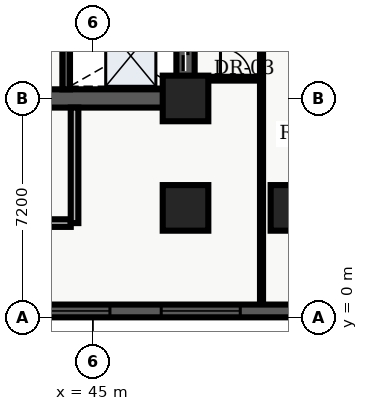
"""IFC4 building model, lengths in metres.
Left out: names, types, materials, properties, quantities, classifications, styles, units other than length and angle.
Written with IfcOpenShell. Run it as: python <this file> out.ifc"""

import sys

from ifc_helpers import new_model, entity, si_unit, converted_unit, direction, frame, origin_with_axes, origin_2d_with_axis, place, context, subcontext, project, spatial, polyline, rectangle, outline, extrude, element, fill, save


model = new_model("IFC4")
c1 = context("Model", 3, precision=1e-05, world=origin_with_axes(), true_north=direction((0.0, 1.0)))
c2 = subcontext(c1, "Body", "Model", "MODEL_VIEW")
j1 = project(units=[si_unit("LENGTHUNIT", "METRE"), converted_unit("PLANEANGLEUNIT", "DEGREE", entity("IfcPlaneAngleMeasure", 0.017), si_unit("PLANEANGLEUNIT", "RADIAN"), dimensions=[0, 0, 0, 0, 0, 0, 0])], contexts=[c1])
p1 = place(None, origin_with_axes())
s1 = spatial("IfcSite", under=j1, at=p1, CompositionType="ELEMENT")
p2 = place(p1, origin_with_axes())
s2 = spatial("IfcBuilding", under=s1, at=p2, CompositionType="ELEMENT")
p3 = place(p2, frame((0.0, 0.0, 10.8), z_axis=(0.0, 0.0, 1.0), x_axis=(1.0, 0.0, 0.0)))
s3 = spatial("IfcBuildingStorey", under=s2, at=p3, CompositionType="ELEMENT", Elevation=10.8)
p4 = place(p3, frame((40.2, 7.2, 0.0), z_axis=(0.0, 0.0, 1.0), x_axis=(1.0, 0.0, 0.0)))
e1 = element("IfcWall", 1, at=p4, inside=s3, PredefinedType="SHEAR", context=c2, shape_type="SweptSolid", body=[
    extrude(outline(polyline([(0.0, -0.3), (7.85, -0.3), (7.85, 0.3), (0.0, 0.3), (0.0, -0.3)])), origin_with_axes(), (0.0, 0.0, 1.0), 4.26),
])
p5 = place(p4, frame((2.175, 0.0, 0.0), z_axis=(0.0, 0.0, 1.0), x_axis=(1.0, 0.0, 0.0)))
e2 = element("IfcOpeningElement", 2, at=p5, cuts=e1, PredefinedType="OPENING", context=c2, shape_type="SweptSolid", body=[
    extrude(rectangle(XDim=1.05, YDim=0.62, at=origin_2d_with_axis()), origin_with_axes(), (0.0, 0.0, 1.0), 2.15),
])
p6 = place(p3, frame((48.05, 7.2, 0.0), z_axis=(0.0, 0.0, 1.0), x_axis=(0.0, 1.0, 0.0)))
e3 = element("IfcWall", 3, at=p6, inside=s3, PredefinedType="SHEAR", context=c2, shape_type="SweptSolid", body=[
    extrude(outline(polyline([(0.0, -0.3), (15.6, -0.3), (15.6, 0.3), (0.0, 0.3), (0.0, -0.3)])), origin_with_axes(), (0.0, 0.0, 1.0), 4.26),
])
p7 = place(p6, frame((1.425, 0.0, 0.0), z_axis=(0.0, 0.0, 1.0), x_axis=(1.0, 0.0, 0.0)))
e4 = element("IfcOpeningElement", 4, at=p7, cuts=e3, PredefinedType="OPENING", context=c2, shape_type="SweptSolid", body=[
    extrude(rectangle(XDim=1.05, YDim=0.62, at=origin_2d_with_axis()), origin_with_axes(), (0.0, 0.0, 1.0), 2.15),
])
p8 = place(p6, frame((3.475, 0.0, 0.0), z_axis=(0.0, 0.0, 1.0), x_axis=(1.0, 0.0, 0.0)))
e5 = element("IfcOpeningElement", 5, at=p8, cuts=e3, PredefinedType="OPENING", context=c2, shape_type="SweptSolid", body=[
    extrude(rectangle(XDim=1.05, YDim=0.62, at=origin_2d_with_axis()), origin_with_axes(), (0.0, 0.0, 1.0), 2.15),
])
p9 = place(p6, frame((5.625, 0.0, 0.0), z_axis=(0.0, 0.0, 1.0), x_axis=(1.0, 0.0, 0.0)))
e6 = element("IfcOpeningElement", 6, at=p9, cuts=e3, PredefinedType="OPENING", context=c2, shape_type="SweptSolid", body=[
    extrude(rectangle(XDim=0.95, YDim=0.62, at=origin_2d_with_axis()), origin_with_axes(), (0.0, 0.0, 1.0), 2.15),
])
p10 = place(p3, frame((44.125, 7.5, 0.0), z_axis=(0.0, 0.0, 1.0), x_axis=(0.0, 1.0, 0.0)))
e7 = element("IfcWall", 7, at=p10, inside=s3, PredefinedType="SHEAR", context=c2, shape_type="SweptSolid", body=[
    extrude(outline(polyline([(0.0, -0.125), (15.0, -0.125), (15.0, 0.125), (0.0, 0.125), (0.0, -0.125)])), origin_with_axes(), (0.0, 0.0, 1.0), 4.26),
])
p11 = place(p3, frame((40.325, 3.1, 0.0), z_axis=(0.0, 0.0, 1.0), x_axis=(1.0, 0.0, 0.0)))
e8 = element("IfcWall", 8, at=p11, inside=s3, PredefinedType="SOLIDWALL", context=c2, shape_type="SweptSolid", body=[
    extrude(outline(polyline([(0.0, -0.125), (3.95, -0.125), (3.95, 0.125), (0.0, 0.125), (0.0, -0.125)])), origin_with_axes(), (0.0, 0.0, 1.0), 3.3),
])
p12 = place(p3, frame((44.4, 3.1, 0.0), z_axis=(0.0, 0.0, 1.0), x_axis=(0.0, 1.0, 0.0)))
e9 = element("IfcWall", 9, at=p12, inside=s3, PredefinedType="SOLIDWALL", context=c2, shape_type="SweptSolid", body=[
    extrude(outline(polyline([(0.0, -0.125), (3.8, -0.125), (3.8, 0.125), (0.0, 0.125), (0.0, -0.125)])), origin_with_axes(), (0.0, 0.0, 1.0), 3.3),
])
for number, where, z_axis, x_axis in (
    (10, (48.05, 3.6, 0.0), (0.0, 0.0, 1.0), (1.0, 0.0, 0.0)),
    (11, (48.05, 7.2, 0.0), (0.0, 0.0, 1.0), (1.0, 0.0, 0.0)),
    (12, (51.6, 3.6, 0.0), (0.0, 0.0, 1.0), (1.0, 0.0, 0.0)),
):
    element("IfcColumn", number, at=place(p3, frame(where, z_axis=z_axis, x_axis=x_axis)), inside=s3, PredefinedType="COLUMN", context=c2, shape_type="SweptSolid", body=[
        extrude(rectangle(XDim=1.5, YDim=1.5, at=origin_2d_with_axis()), origin_with_axes(), (0.0, 0.0, 1.0), 4.5),
    ])
p13 = place(p3, frame((50.55, 0.38, 0.0), z_axis=(0.0, 0.0, 1.0), x_axis=(0.0, 1.0, 0.0)))
e13 = element("IfcWall", 13, at=p13, inside=s3, PredefinedType="PARTITIONING", context=c2, shape_type="SweptSolid", body=[
    extrude(outline(polyline([(0.0, -0.05), (38.84, -0.05), (38.84, 0.05), (0.0, 0.05), (0.0, -0.05)])), origin_with_axes(), (0.0, 0.0, 1.0), 3.2),
])
p14 = place(p13, frame((12.8, 0.0, 0.0), z_axis=(0.0, 0.0, 1.0), x_axis=(1.0, 0.0, 0.0)))
e14 = element("IfcOpeningElement", 14, at=p14, cuts=e13, PredefinedType="OPENING", context=c2, shape_type="SweptSolid", body=[
    extrude(rectangle(XDim=1.6, YDim=0.12, at=origin_2d_with_axis()), origin_with_axes(), (0.0, 0.0, 1.0), 2.2),
])
p15 = place(p13, frame((27.8, 0.0, 0.0), z_axis=(0.0, 0.0, 1.0), x_axis=(1.0, 0.0, 0.0)))
e15 = element("IfcOpeningElement", 15, at=p15, cuts=e13, PredefinedType="OPENING", context=c2, shape_type="SweptSolid", body=[
    extrude(rectangle(XDim=1.6, YDim=0.12, at=origin_2d_with_axis()), origin_with_axes(), (0.0, 0.0, 1.0), 2.2),
])
p16 = place(p3, frame((48.05, 7.85, 0.0), z_axis=(0.0, 0.0, 1.0), x_axis=(1.0, 0.0, 0.0)))
e16 = element("IfcWall", 16, at=p16, inside=s3, PredefinedType="PARTITIONING", context=c2, shape_type="SweptSolid", body=[
    extrude(outline(polyline([(0.0, -0.062), (2.5, -0.062), (2.5, 0.062), (0.0, 0.062), (0.0, -0.062)])), origin_with_axes(), (0.0, 0.0, 1.0), 3.2),
])
p17 = place(p16, frame((1.65, 0.0, 0.0), z_axis=(0.0, 0.0, 1.0), x_axis=(1.0, 0.0, 0.0)))
e17 = element("IfcOpeningElement", 17, at=p17, cuts=e16, PredefinedType="OPENING", context=c2, shape_type="SweptSolid", body=[
    extrude(rectangle(XDim=1.0, YDim=0.145, at=origin_2d_with_axis()), origin_with_axes(), (0.0, 0.0, 1.0), 2.15),
])
p18 = place(p3, frame((67.98, 0.21, 0.0), z_axis=(0.0, 0.0, 1.0), x_axis=(-1.0, 0.0, 0.0)))
e18 = element("IfcWall", 18, at=p18, inside=s3, PredefinedType="SOLIDWALL", context=c2, shape_type="SweptSolid", body=[
    extrude(outline(polyline([(0.0, -0.21), (67.98, -0.21), (67.98, 0.21), (0.0, 0.21), (0.0, -0.21)])), origin_with_axes(), (0.0, 0.0, 1.0), 4.26),
])
p19 = place(p18, frame((3.168, 0.0, 0.45), z_axis=(0.0, 0.0, 1.0), x_axis=(1.0, 0.0, 0.0)))
e19 = element("IfcOpeningElement", 19, at=p19, cuts=e18, PredefinedType="OPENING", context=c2, shape_type="SweptSolid", body=[
    extrude(rectangle(XDim=2.6, YDim=0.44, at=origin_2d_with_axis()), origin_with_axes(), (0.0, 0.0, 1.0), 2.8),
])
p20 = place(p18, frame((8.305, 0.0, 0.45), z_axis=(0.0, 0.0, 1.0), x_axis=(1.0, 0.0, 0.0)))
e20 = element("IfcOpeningElement", 20, at=p20, cuts=e18, PredefinedType="OPENING", context=c2, shape_type="SweptSolid", body=[
    extrude(rectangle(XDim=2.6, YDim=0.44, at=origin_2d_with_axis()), origin_with_axes(), (0.0, 0.0, 1.0), 2.8),
])
p21 = place(p18, frame((13.442, 0.0, 0.45), z_axis=(0.0, 0.0, 1.0), x_axis=(1.0, 0.0, 0.0)))
e21 = element("IfcOpeningElement", 21, at=p21, cuts=e18, PredefinedType="OPENING", context=c2, shape_type="SweptSolid", body=[
    extrude(rectangle(XDim=2.6, YDim=0.44, at=origin_2d_with_axis()), origin_with_axes(), (0.0, 0.0, 1.0), 2.8),
])
p22 = place(p18, frame((19.429, 0.0, 0.45), z_axis=(0.0, 0.0, 1.0), x_axis=(1.0, 0.0, 0.0)))
e22 = element("IfcOpeningElement", 22, at=p22, cuts=e18, PredefinedType="OPENING", context=c2, shape_type="SweptSolid", body=[
    extrude(rectangle(XDim=2.6, YDim=0.44, at=origin_2d_with_axis()), origin_with_axes(), (0.0, 0.0, 1.0), 2.8),
])
p23 = place(p18, frame((23.716, 0.0, 0.45), z_axis=(0.0, 0.0, 1.0), x_axis=(1.0, 0.0, 0.0)))
e23 = element("IfcOpeningElement", 23, at=p23, cuts=e18, PredefinedType="OPENING", context=c2, shape_type="SweptSolid", body=[
    extrude(rectangle(XDim=2.6, YDim=0.44, at=origin_2d_with_axis()), origin_with_axes(), (0.0, 0.0, 1.0), 2.8),
])
p24 = place(p18, frame((28.853, 0.0, 0.45), z_axis=(0.0, 0.0, 1.0), x_axis=(1.0, 0.0, 0.0)))
e24 = element("IfcOpeningElement", 24, at=p24, cuts=e18, PredefinedType="OPENING", context=c2, shape_type="SweptSolid", body=[
    extrude(rectangle(XDim=2.6, YDim=0.44, at=origin_2d_with_axis()), origin_with_axes(), (0.0, 0.0, 1.0), 2.8),
])
p25 = place(p18, frame((33.99, 0.0, 0.45), z_axis=(0.0, 0.0, 1.0), x_axis=(1.0, 0.0, 0.0)))
e25 = element("IfcOpeningElement", 25, at=p25, cuts=e18, PredefinedType="OPENING", context=c2, shape_type="SweptSolid", body=[
    extrude(rectangle(XDim=2.6, YDim=0.44, at=origin_2d_with_axis()), origin_with_axes(), (0.0, 0.0, 1.0), 2.8),
])
p26 = place(p18, frame((39.127, 0.0, 0.45), z_axis=(0.0, 0.0, 1.0), x_axis=(1.0, 0.0, 0.0)))
e26 = element("IfcOpeningElement", 26, at=p26, cuts=e18, PredefinedType="OPENING", context=c2, shape_type="SweptSolid", body=[
    extrude(rectangle(XDim=2.6, YDim=0.44, at=origin_2d_with_axis()), origin_with_axes(), (0.0, 0.0, 1.0), 2.8),
])
p27 = place(p18, frame((44.264, 0.0, 0.45), z_axis=(0.0, 0.0, 1.0), x_axis=(1.0, 0.0, 0.0)))
e27 = element("IfcOpeningElement", 27, at=p27, cuts=e18, PredefinedType="OPENING", context=c2, shape_type="SweptSolid", body=[
    extrude(rectangle(XDim=2.6, YDim=0.44, at=origin_2d_with_axis()), origin_with_axes(), (0.0, 0.0, 1.0), 2.8),
])
p28 = place(p18, frame((49.401, 0.0, 0.45), z_axis=(0.0, 0.0, 1.0), x_axis=(1.0, 0.0, 0.0)))
e28 = element("IfcOpeningElement", 28, at=p28, cuts=e18, PredefinedType="OPENING", context=c2, shape_type="SweptSolid", body=[
    extrude(rectangle(XDim=2.6, YDim=0.44, at=origin_2d_with_axis()), origin_with_axes(), (0.0, 0.0, 1.0), 2.8),
])
p29 = place(p18, frame((54.538, 0.0, 0.45), z_axis=(0.0, 0.0, 1.0), x_axis=(1.0, 0.0, 0.0)))
e29 = element("IfcOpeningElement", 29, at=p29, cuts=e18, PredefinedType="OPENING", context=c2, shape_type="SweptSolid", body=[
    extrude(rectangle(XDim=2.6, YDim=0.44, at=origin_2d_with_axis()), origin_with_axes(), (0.0, 0.0, 1.0), 2.8),
])
p30 = place(p18, frame((59.675, 0.0, 0.45), z_axis=(0.0, 0.0, 1.0), x_axis=(1.0, 0.0, 0.0)))
e30 = element("IfcOpeningElement", 30, at=p30, cuts=e18, PredefinedType="OPENING", context=c2, shape_type="SweptSolid", body=[
    extrude(rectangle(XDim=2.6, YDim=0.44, at=origin_2d_with_axis()), origin_with_axes(), (0.0, 0.0, 1.0), 2.8),
])
p31 = place(p18, frame((64.812, 0.0, 0.45), z_axis=(0.0, 0.0, 1.0), x_axis=(1.0, 0.0, 0.0)))
e31 = element("IfcOpeningElement", 31, at=p31, cuts=e18, PredefinedType="OPENING", context=c2, shape_type="SweptSolid", body=[
    extrude(rectangle(XDim=2.6, YDim=0.44, at=origin_2d_with_axis()), origin_with_axes(), (0.0, 0.0, 1.0), 2.8),
])
p32 = place(p6, frame((1.425, 0.0, 0.0), z_axis=(0.0, 0.0, 1.0), x_axis=(1.0, 0.0, 0.0)))
e32 = element("IfcDoor", 32, at=p32, inside=s3, OperationType="SLIDING_TO_LEFT", PredefinedType="DOOR", context=c2, shape_type="SweptSolid", body=[
    extrude(rectangle(XDim=1.05, YDim=0.09, at=origin_2d_with_axis()), origin_with_axes(), (0.0, 0.0, 1.0), 2.15),
])
fill(e4, e32)
p33 = place(p16, frame((1.65, 0.0, 0.0), z_axis=(0.0, 0.0, 1.0), x_axis=(1.0, 0.0, 0.0)))
e33 = element("IfcDoor", 33, at=p33, inside=s3, OperationType="SINGLE_SWING_LEFT", PredefinedType="DOOR", context=c2, shape_type="SweptSolid", body=[
    extrude(rectangle(XDim=1.0, YDim=0.075, at=origin_2d_with_axis()), origin_with_axes(), (0.0, 0.0, 1.0), 2.15),
])
fill(e17, e33)
p34 = place(p18, frame((19.429, 0.0, 0.45), z_axis=(0.0, 0.0, 1.0), x_axis=(1.0, 0.0, 0.0)))
e34 = element("IfcWindow", 34, at=p34, inside=s3, PredefinedType="WINDOW", context=c2, shape_type="SweptSolid", body=[
    extrude(rectangle(XDim=2.6, YDim=0.09, at=origin_2d_with_axis()), origin_with_axes(), (0.0, 0.0, 1.0), 2.8),
])
fill(e22, e34)
p35 = place(p18, frame((23.716, 0.0, 0.45), z_axis=(0.0, 0.0, 1.0), x_axis=(1.0, 0.0, 0.0)))
e35 = element("IfcWindow", 35, at=p35, inside=s3, PredefinedType="WINDOW", context=c2, shape_type="SweptSolid", body=[
    extrude(rectangle(XDim=2.6, YDim=0.09, at=origin_2d_with_axis()), origin_with_axes(), (0.0, 0.0, 1.0), 2.8),
])
fill(e23, e35)
save(model, sys.argv[1])
